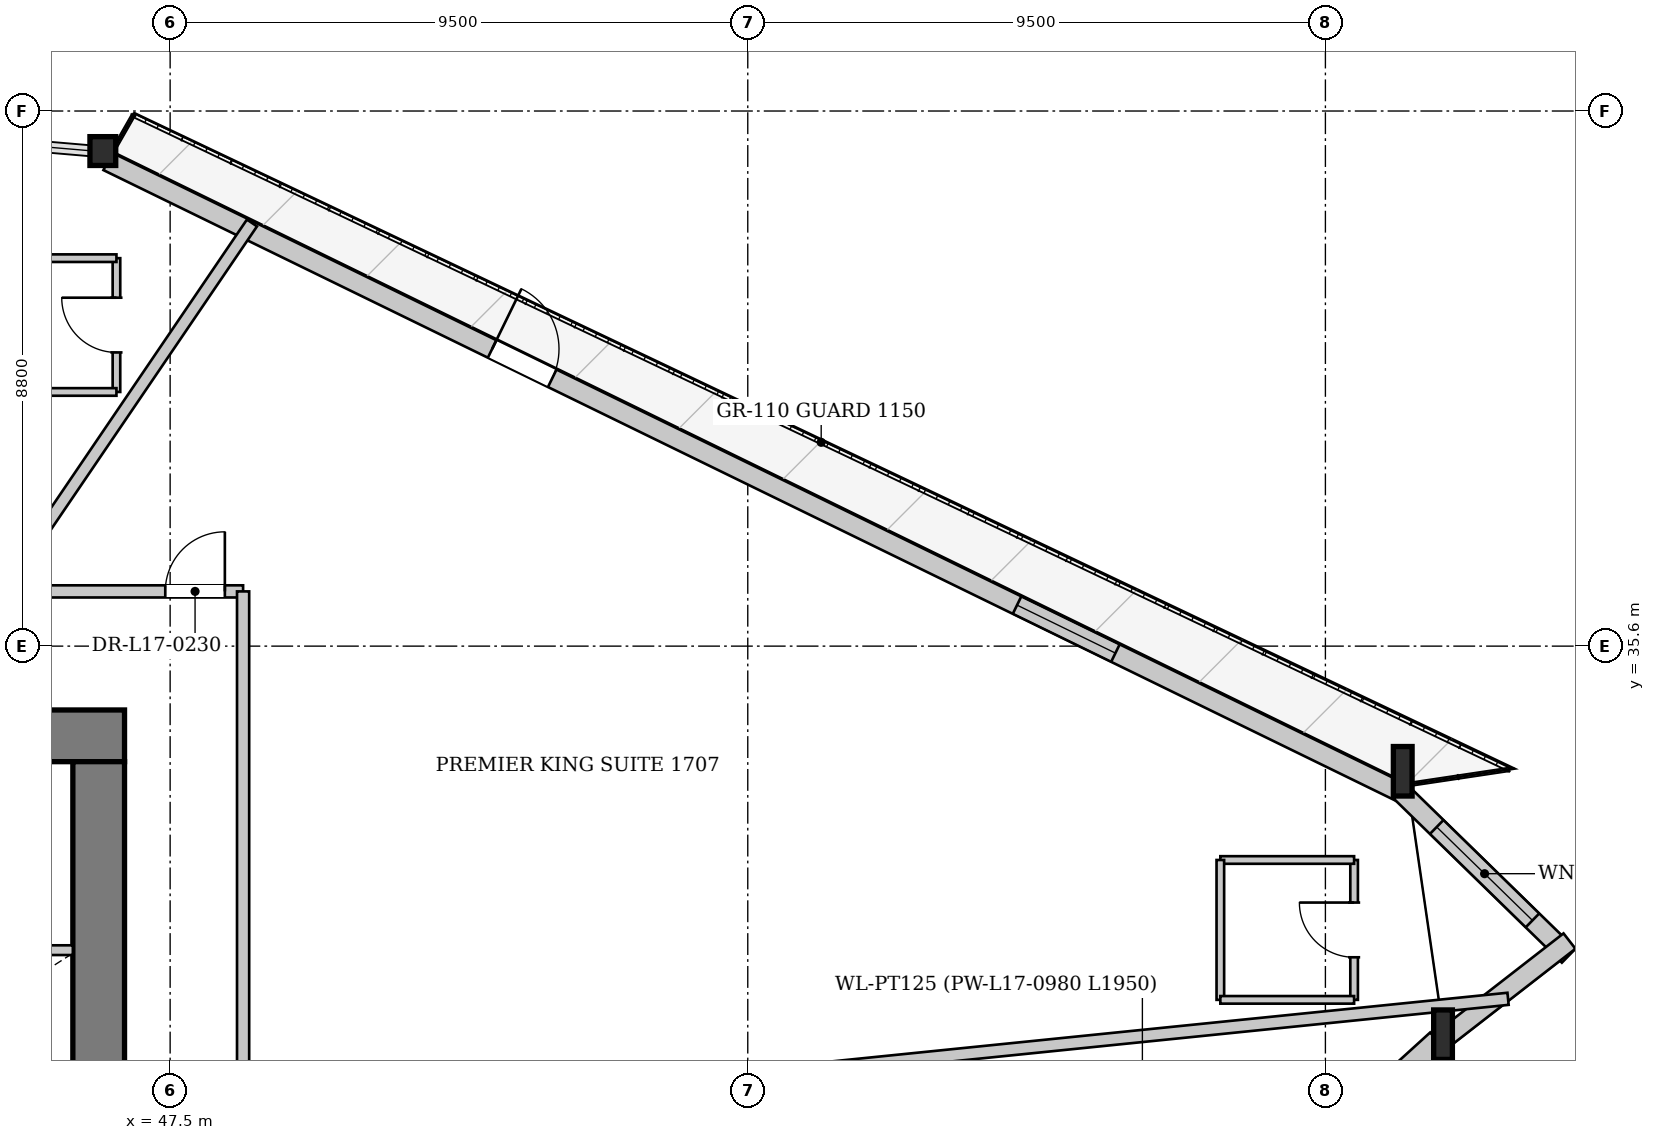
"""IFC4 building model, lengths in metres.
Left out: names, types, materials, properties, quantities, classifications, styles, units other than length and angle.
Written with IfcOpenShell. Run it as: python <this file> out.ifc"""

import sys

from ifc_helpers import new_model, si_unit, direction, frame, frame_2d, origin, origin_2d, place, context, subcontext, project, spatial, rectangle, i_section, extrude, source, transform, mapped, element, fill, save


model = new_model("IFC4")
c1 = context("Model", 3, precision=1e-05, world=origin(), true_north=direction((0.0, 1.0)))
c2 = subcontext(c1, "Body", "Model", "MODEL_VIEW")
j1 = project(units=[si_unit("LENGTHUNIT", "METRE"), si_unit("PLANEANGLEUNIT", "RADIAN")], contexts=[c1])
p1 = place(None, origin())
s1 = spatial("IfcSite", under=j1, at=p1, CompositionType="ELEMENT")
p2 = place(p1, origin())
s2 = spatial("IfcBuilding", under=s1, at=p2, CompositionType="ELEMENT")
p3 = place(p2, frame((0.0, 0.0, 68.35)))
s3 = spatial("IfcBuildingStorey", under=s2, at=p3, CompositionType="ELEMENT", Elevation=68.35)
m1 = source(origin(), c2, "Body", "SweptSolid", [
    extrude(i_section(OverallWidth=0.308, OverallDepth=0.814, WebThickness=0.021, FlangeThickness=0.04, at=origin_2d()), origin(), (0.0, 0.0, 1.0), 3.421),
])
p4 = place(p3, frame((68.478, 28.965, 0.0), z_axis=(-0.02561704692, 0.143212850053, 0.989360321868), x_axis=(-0.984376000373, -0.176079214815, 0.0)))
e1 = element("IfcColumn", 1, at=p4, inside=s3, PredefinedType="COLUMN", context=c2, shape_type="MappedRepresentation", body=[
    mapped(m1, transform((0.0, 0.0, 0.0), x_axis=(1.0, 0.0, 0.0), y_axis=(0.0, 1.0, 0.0), z_axis=(0.0, 0.0, 1.0), scale=1.0)),
])
m2 = source(origin(), c2, "Body", "SweptSolid", [
    extrude(i_section(OverallWidth=0.308, OverallDepth=0.814, WebThickness=0.021, FlangeThickness=0.04, at=origin_2d()), origin(), (0.0, 0.0, 1.0), 3.417),
])
p5 = place(p3, frame((67.847, 33.321, 0.0), z_axis=(-0.043870117237, 0.12918106183, 0.990650122939), x_axis=(-0.946887606415, -0.321564707046, 0.0)))
e2 = element("IfcColumn", 2, at=p5, inside=s3, PredefinedType="COLUMN", context=c2, shape_type="MappedRepresentation", body=[
    mapped(m2, transform((0.0, 0.0, 0.0), x_axis=(1.0, 0.0, 0.0), y_axis=(0.0, 1.0, 0.0), z_axis=(0.0, 0.0, 1.0), scale=1.0)),
])
m3 = source(origin(), c2, "Body", "SweptSolid", [
    extrude(i_section(OverallWidth=0.424, OverallDepth=0.474, WebThickness=0.043, FlangeThickness=0.068, at=origin_2d()), origin(), (0.0, 0.0, 1.0), 3.399),
])
p6 = place(p3, frame((46.543, 43.716, 0.0), z_axis=(-0.088355592773, 0.01501326739, 0.995975848617), x_axis=(-0.167517592781, -0.985869086699, 0.0)))
e3 = element("IfcColumn", 3, at=p6, inside=s3, PredefinedType="COLUMN", context=c2, shape_type="MappedRepresentation", body=[
    mapped(m3, transform((0.0, 0.0, 0.0), x_axis=(1.0, 0.0, 0.0), y_axis=(0.0, 1.0, 0.0), z_axis=(0.0, 0.0, 1.0), scale=1.0)),
])
p7 = place(p3, frame((46.473, 43.572, 0.0), z_axis=(0.0, 0.0, 1.0), x_axis=(0.898719243612, -0.438524481827, 0.0)))
e4 = element("IfcWall", 4, at=p7, inside=s3, PredefinedType="SOLIDWALL", context=c2, shape_type="SweptSolid", body=[
    extrude(rectangle(XDim=23.704, YDim=0.32, at=frame_2d((11.852, 0.0))), origin(), (0.0, 0.0, 1.0), 2.592),
])
p8 = place(p7, frame((7.035, 0.0, 0.0)))
e5 = element("IfcOpeningElement", 5, at=p8, cuts=e4, PredefinedType="OPENING", context=c2, shape_type="SweptSolid", body=[
    extrude(rectangle(XDim=1.1, YDim=2.3, at=frame_2d((0.55, 1.15))), frame((0.0, 0.17, 0.0), z_axis=(0.0, -1.0, 0.0), x_axis=(1.0, 0.0, 0.0)), (0.0, 0.0, 1.0), 0.34),
])
p9 = place(p7, frame((16.641, 0.0, 0.272)))
e6 = element("IfcOpeningElement", 6, at=p9, cuts=e4, PredefinedType="OPENING", context=c2, shape_type="SweptSolid", body=[
    extrude(rectangle(XDim=1.8, YDim=2.2, at=frame_2d((0.9, 1.1))), frame((0.0, 0.17, 0.0), z_axis=(0.0, -1.0, 0.0), x_axis=(1.0, 0.0, 0.0)), (0.0, 0.0, 1.0), 0.34),
])
p10 = place(p3, frame((67.735, 33.207, 0.0), z_axis=(0.0, 0.0, 1.0), x_axis=(0.715835098873, -0.698269368669, 0.0)))
e7 = element("IfcWall", 7, at=p10, inside=s3, PredefinedType="SOLIDWALL", context=c2, shape_type="SweptSolid", body=[
    extrude(rectangle(XDim=3.864, YDim=0.32, at=frame_2d((1.932, 0.0))), origin(), (0.0, 0.0, 1.0), 2.592),
])
p11 = place(p10, frame((0.832, 0.0, 0.222)))
e8 = element("IfcOpeningElement", 8, at=p11, cuts=e7, PredefinedType="OPENING", context=c2, shape_type="SweptSolid", body=[
    extrude(rectangle(XDim=2.2, YDim=2.25, at=frame_2d((1.1, 1.125))), frame((0.0, 0.17, 0.0), z_axis=(0.0, -1.0, 0.0), x_axis=(1.0, 0.0, 0.0)), (0.0, 0.0, 1.0), 0.34),
])
p12 = place(p3, frame((70.514, 30.75, 0.0), z_axis=(0.0, 0.0, 1.0), x_axis=(-0.789595358012, -0.613627876327, 0.0)))
e9 = element("IfcWall", 9, at=p12, inside=s3, PredefinedType="SOLIDWALL", context=c2, shape_type="SweptSolid", body=[
    extrude(rectangle(XDim=2.703, YDim=0.32, at=frame_2d((1.351, 0.0))), origin(), (0.0, 0.0, 1.0), 2.592),
])
p13 = place(p3, frame((68.351, 29.106, 0.0), z_axis=(0.0, 0.0, 1.0), x_axis=(-0.740297486448, -0.672279429671, 0.0)))
e10 = element("IfcWall", 10, at=p13, inside=s3, PredefinedType="SOLIDWALL", context=c2, shape_type="SweptSolid", body=[
    extrude(rectangle(XDim=24.318, YDim=0.38, at=frame_2d((12.159, 0.0))), origin(), (0.0, 0.0, 1.0), 2.592),
])
p14 = place(p13, frame((5.709, 0.0, 0.222)))
e11 = element("IfcOpeningElement", 11, at=p14, cuts=e10, PredefinedType="OPENING", context=c2, shape_type="SweptSolid", body=[
    extrude(rectangle(XDim=2.2, YDim=2.25, at=frame_2d((1.1, 1.125))), frame((0.0, 0.2, 0.0), z_axis=(0.0, -1.0, 0.0), x_axis=(1.0, 0.0, 0.0)), (0.0, 0.0, 1.0), 0.4),
])
p15 = place(p13, frame((16.409, 0.0, 0.222)))
e12 = element("IfcOpeningElement", 12, at=p15, cuts=e10, PredefinedType="OPENING", context=c2, shape_type="SweptSolid", body=[
    extrude(rectangle(XDim=2.2, YDim=2.25, at=frame_2d((1.1, 1.125))), frame((0.0, 0.2, 0.0), z_axis=(0.0, -1.0, 0.0), x_axis=(1.0, 0.0, 0.0)), (0.0, 0.0, 1.0), 0.4),
])
p16 = place(p3, frame((29.25, 34.125, 0.0), z_axis=(0.0, 0.0, 1.0), x_axis=(1.0, 0.0, 0.0)))
e13 = element("IfcWall", 13, at=p16, inside=s3, PredefinedType="SHEAR", context=c2, shape_type="SweptSolid", body=[
    extrude(rectangle(XDim=17.5, YDim=0.85, at=frame_2d((8.75, 0.0))), origin(), (0.0, 0.0, 1.0), 3.3),
])
p17 = place(p16, frame((1.85, 0.0, 0.0)))
e14 = element("IfcOpeningElement", 14, at=p17, cuts=e13, PredefinedType="OPENING", context=c2, shape_type="SweptSolid", body=[
    extrude(rectangle(XDim=0.95, YDim=2.1, at=frame_2d((0.475, 1.05))), frame((0.0, 0.435, 0.0), z_axis=(0.0, -1.0, 0.0), x_axis=(1.0, 0.0, 0.0)), (0.0, 0.0, 1.0), 0.87),
])
p18 = place(p16, frame((4.23, 0.0, 0.0)))
e15 = element("IfcOpeningElement", 15, at=p18, cuts=e13, PredefinedType="OPENING", context=c2, shape_type="SweptSolid", body=[
    extrude(rectangle(XDim=1.32, YDim=2.2, at=frame_2d((0.66, 1.1))), frame((0.0, 0.435, 0.0), z_axis=(0.0, -1.0, 0.0), x_axis=(1.0, 0.0, 0.0)), (0.0, 0.0, 1.0), 0.87),
])
p19 = place(p16, frame((15.3, 0.0, 0.0)))
e16 = element("IfcOpeningElement", 16, at=p19, cuts=e13, PredefinedType="OPENING", context=c2, shape_type="SweptSolid", body=[
    extrude(rectangle(XDim=0.95, YDim=2.1, at=frame_2d((0.475, 1.05))), frame((0.0, 0.435, 0.0), z_axis=(0.0, -1.0, 0.0), x_axis=(1.0, 0.0, 0.0)), (0.0, 0.0, 1.0), 0.87),
])
p20 = place(p3, frame((46.325, 33.7, 0.0), z_axis=(0.0, 0.0, 1.0), x_axis=(0.0, -1.0, 0.0)))
e17 = element("IfcWall", 17, at=p20, inside=s3, PredefinedType="SHEAR", context=c2, shape_type="SweptSolid", body=[
    extrude(rectangle(XDim=14.2, YDim=0.85, at=frame_2d((7.1, 0.0))), origin(), (0.0, 0.0, 1.0), 3.3),
])
p21 = place(p20, frame((5.18, 0.0, 0.0)))
e18 = element("IfcOpeningElement", 18, at=p21, cuts=e17, PredefinedType="OPENING", context=c2, shape_type="SweptSolid", body=[
    extrude(rectangle(XDim=1.6, YDim=2.2, at=frame_2d((0.8, 1.1))), frame((0.0, 0.435, 0.0), z_axis=(0.0, -1.0, 0.0), x_axis=(1.0, 0.0, 0.0)), (0.0, 0.0, 1.0), 0.87),
])
p22 = place(p3, frame((40.72, 30.6, 0.0), z_axis=(0.0, 0.0, 1.0), x_axis=(1.0, 0.0, 0.0)))
e19 = element("IfcWall", 19, at=p22, inside=s3, PredefinedType="PARTITIONING", context=c2, shape_type="SweptSolid", body=[
    extrude(rectangle(XDim=5.18, YDim=0.16, at=frame_2d((2.59, 0.0))), origin(), (0.0, 0.0, 1.0), 3.3),
])
p23 = place(p3, frame((48.7, 27.687, 0.0), z_axis=(0.0, 0.0, 1.0), x_axis=(0.99488143762, 0.101049122113, 0.0)))
e20 = element("IfcWall", 20, at=p23, inside=s3, PredefinedType="PARTITIONING", context=c2, shape_type="SweptSolid", body=[
    extrude(rectangle(XDim=20.911, YDim=0.2, at=frame_2d((10.456, 0.0))), origin(), (0.0, 0.0, 1.0), 2.795),
])
p24 = place(p3, frame((44.728, 36.5, 0.0), z_axis=(0.0, 0.0, 1.0), x_axis=(0.562076643958, 0.827085150584, 0.0)))
e21 = element("IfcWall", 21, at=p24, inside=s3, PredefinedType="PARTITIONING", context=c2, shape_type="SweptSolid", body=[
    extrude(rectangle(XDim=7.326, YDim=0.2, at=frame_2d((3.663, 0.0))), origin(), (0.0, 0.0, 1.0), 3.3),
])
p25 = place(p3, frame((66.972, 29.783, 0.0), z_axis=(0.0, 0.0, 1.0), x_axis=(0.0, 1.0, 0.0)))
e22 = element("IfcWall", 22, at=p25, inside=s3, PredefinedType="PARTITIONING", context=c2, shape_type="SweptSolid", body=[
    extrude(rectangle(XDim=2.3, YDim=0.125, at=frame_2d((1.15, 0.0))), origin(), (0.0, 0.0, 1.0), 3.3),
])
p26 = place(p25, frame((0.7, 0.0, 0.0)))
e23 = element("IfcOpeningElement", 23, at=p26, cuts=e22, PredefinedType="OPENING", context=c2, shape_type="SweptSolid", body=[
    extrude(rectangle(XDim=0.9, YDim=2.1, at=frame_2d((0.45, 1.05))), frame((0.0, 0.073, 0.0), z_axis=(0.0, -1.0, 0.0), x_axis=(1.0, 0.0, 0.0)), (0.0, 0.0, 1.0), 0.145),
])
p27 = place(p3, frame((66.972, 32.083, 0.0), z_axis=(0.0, 0.0, 1.0), x_axis=(-1.0, 0.0, 0.0)))
e24 = element("IfcWall", 24, at=p27, inside=s3, PredefinedType="PARTITIONING", context=c2, shape_type="SweptSolid", body=[
    extrude(rectangle(XDim=2.2, YDim=0.125, at=frame_2d((1.1, 0.0))), origin(), (0.0, 0.0, 1.0), 3.3),
])
p28 = place(p3, frame((64.772, 32.083, 0.0), z_axis=(0.0, 0.0, 1.0), x_axis=(0.0, -1.0, 0.0)))
e25 = element("IfcWall", 25, at=p28, inside=s3, PredefinedType="PARTITIONING", context=c2, shape_type="SweptSolid", body=[
    extrude(rectangle(XDim=2.3, YDim=0.125, at=frame_2d((1.15, 0.0))), origin(), (0.0, 0.0, 1.0), 3.3),
])
p29 = place(p3, frame((64.772, 29.783, 0.0), z_axis=(0.0, 0.0, 1.0), x_axis=(1.0, 0.0, 0.0)))
e26 = element("IfcWall", 26, at=p29, inside=s3, PredefinedType="PARTITIONING", context=c2, shape_type="SweptSolid", body=[
    extrude(rectangle(XDim=2.2, YDim=0.125, at=frame_2d((1.1, 0.0))), origin(), (0.0, 0.0, 1.0), 3.3),
])
p30 = place(p3, frame((46.617, 39.78, 0.0), z_axis=(0.0, 0.0, 1.0), x_axis=(0.0, 1.0, 0.0)))
e27 = element("IfcWall", 27, at=p30, inside=s3, PredefinedType="PARTITIONING", context=c2, shape_type="SweptSolid", body=[
    extrude(rectangle(XDim=2.2, YDim=0.125, at=frame_2d((1.1, 0.0))), origin(), (0.0, 0.0, 1.0), 3.3),
])
p31 = place(p30, frame((0.65, 0.0, 0.0)))
e28 = element("IfcOpeningElement", 28, at=p31, cuts=e27, PredefinedType="OPENING", context=c2, shape_type="SweptSolid", body=[
    extrude(rectangle(XDim=0.9, YDim=2.1, at=frame_2d((0.45, 1.05))), frame((0.0, 0.073, 0.0), z_axis=(0.0, -1.0, 0.0), x_axis=(1.0, 0.0, 0.0)), (0.0, 0.0, 1.0), 0.145),
])
for number, where, z_axis, x_axis in (
    (29, (46.617, 41.98, 0.0), (0.0, 0.0, 1.0), (-1.0, 0.0, 0.0)),
    (30, (44.317, 39.78, 0.0), (0.0, 0.0, 1.0), (1.0, 0.0, 0.0)),
):
    element("IfcWall", number, at=place(p3, frame(where, z_axis=z_axis, x_axis=x_axis)), inside=s3, PredefinedType="PARTITIONING", context=c2, shape_type="SweptSolid", body=[
        extrude(rectangle(XDim=2.3, YDim=0.125, at=frame_2d((1.15, 0.0))), origin(), (0.0, 0.0, 1.0), 3.3),
    ])
p32 = place(p3, frame((27.3, 36.5, 0.0), z_axis=(0.0, 0.0, 1.0), x_axis=(1.0, 0.0, 0.0)))
e31 = element("IfcWall", 31, at=p32, inside=s3, PredefinedType="PARTITIONING", context=c2, shape_type="SweptSolid", body=[
    extrude(rectangle(XDim=21.4, YDim=0.2, at=frame_2d((10.7, 0.0))), origin(), (0.0, 0.0, 1.0), 3.3),
])
p33 = place(p32, frame((3.439, 0.0, 0.0)))
e32 = element("IfcOpeningElement", 32, at=p33, cuts=e31, PredefinedType="OPENING", context=c2, shape_type="SweptSolid", body=[
    extrude(rectangle(XDim=0.98, YDim=2.15, at=frame_2d((0.49, 1.075))), frame((0.0, 0.11, 0.0), z_axis=(0.0, -1.0, 0.0), x_axis=(1.0, 0.0, 0.0)), (0.0, 0.0, 1.0), 0.22),
])
p34 = place(p32, frame((20.12, 0.0, 0.0)))
e33 = element("IfcOpeningElement", 33, at=p34, cuts=e31, PredefinedType="OPENING", context=c2, shape_type="SweptSolid", body=[
    extrude(rectangle(XDim=0.98, YDim=2.15, at=frame_2d((0.49, 1.075))), frame((0.0, 0.11, 0.0), z_axis=(0.0, -1.0, 0.0), x_axis=(1.0, 0.0, 0.0)), (0.0, 0.0, 1.0), 0.22),
])
p35 = place(p32, frame((13.104, 0.0, 0.0)))
e34 = element("IfcOpeningElement", 34, at=p35, cuts=e31, PredefinedType="OPENING", context=c2, shape_type="SweptSolid", body=[
    extrude(rectangle(XDim=0.98, YDim=2.15, at=frame_2d((0.49, 1.075))), frame((0.0, 0.11, 0.0), z_axis=(0.0, -1.0, 0.0), x_axis=(1.0, 0.0, 0.0)), (0.0, 0.0, 1.0), 0.22),
])
p36 = place(p3, frame((48.7, 16.7, 0.0), z_axis=(0.0, 0.0, 1.0), x_axis=(0.0, 1.0, 0.0)))
e35 = element("IfcWall", 35, at=p36, inside=s3, PredefinedType="PARTITIONING", context=c2, shape_type="SweptSolid", body=[
    extrude(rectangle(XDim=19.8, YDim=0.2, at=frame_2d((9.9, 0.0))), origin(), (0.0, 0.0, 1.0), 3.3),
])
p37 = place(p36, frame((4.413, 0.0, 0.0)))
e36 = element("IfcOpeningElement", 36, at=p37, cuts=e35, PredefinedType="OPENING", context=c2, shape_type="SweptSolid", body=[
    extrude(rectangle(XDim=0.98, YDim=2.15, at=frame_2d((0.49, 1.075))), frame((0.0, 0.11, 0.0), z_axis=(0.0, -1.0, 0.0), x_axis=(1.0, 0.0, 0.0)), (0.0, 0.0, 1.0), 0.22),
])
m4 = source(origin(), c2, "Body", "SweptSolid", [
    extrude(rectangle(XDim=1.1, YDim=2.3, at=frame_2d((0.55, 1.15))), frame((0.0, 0.025, 0.0), z_axis=(0.0, -1.0, 0.0), x_axis=(1.0, 0.0, 0.0)), (0.0, 0.0, 1.0), 0.05),
])
p38 = place(p8, origin())
e37 = element("IfcDoor", 37, at=p38, inside=s3, OperationType="SINGLE_SWING_LEFT", PredefinedType="DOOR", context=c2, shape_type="MappedRepresentation", body=[
    mapped(m4, transform((0.0, 0.0, 0.0), x_axis=(1.0, 0.0, 0.0), y_axis=(0.0, 1.0, 0.0), z_axis=(0.0, 0.0, 1.0), scale=1.0)),
])
fill(e5, e37)
m5 = source(origin(), c2, "Body", "SweptSolid", [
    extrude(rectangle(XDim=1.8, YDim=2.2, at=frame_2d((0.9, 1.1))), frame((0.0, 0.03, 0.0), z_axis=(0.0, -1.0, 0.0), x_axis=(1.0, 0.0, 0.0)), (0.0, 0.0, 1.0), 0.06),
])
p39 = place(p9, origin())
e38 = element("IfcWindow", 38, at=p39, inside=s3, PartitioningType="SINGLE_PANEL", PredefinedType="WINDOW", context=c2, shape_type="MappedRepresentation", body=[
    mapped(m5, transform((0.0, 0.0, 0.0), x_axis=(1.0, 0.0, 0.0), y_axis=(0.0, 1.0, 0.0), z_axis=(0.0, 0.0, 1.0), scale=1.0)),
])
fill(e6, e38)
m6 = source(origin(), c2, "Body", "SweptSolid", [
    extrude(rectangle(XDim=2.2, YDim=2.25, at=frame_2d((1.1, 1.125))), frame((0.0, 0.03, 0.0), z_axis=(0.0, -1.0, 0.0), x_axis=(1.0, 0.0, 0.0)), (0.0, 0.0, 1.0), 0.06),
])
p40 = place(p11, origin())
e39 = element("IfcWindow", 39, at=p40, inside=s3, PartitioningType="SINGLE_PANEL", PredefinedType="WINDOW", context=c2, shape_type="MappedRepresentation", body=[
    mapped(m6, transform((0.0, 0.0, 0.0), x_axis=(1.0, 0.0, 0.0), y_axis=(0.0, 1.0, 0.0), z_axis=(0.0, 0.0, 1.0), scale=1.0)),
])
fill(e8, e39)
m7 = source(origin(), c2, "Body", "SweptSolid", [
    extrude(rectangle(XDim=0.9, YDim=2.1, at=frame_2d((0.45, 1.05))), frame((0.0, 0.025, 0.0), z_axis=(0.0, -1.0, 0.0), x_axis=(1.0, 0.0, 0.0)), (0.0, 0.0, 1.0), 0.05),
])
p41 = place(p26, origin())
e40 = element("IfcDoor", 40, at=p41, inside=s3, OperationType="SINGLE_SWING_RIGHT", PredefinedType="DOOR", context=c2, shape_type="MappedRepresentation", body=[
    mapped(m7, transform((0.0, 0.0, 0.0), x_axis=(1.0, 0.0, 0.0), y_axis=(0.0, 1.0, 0.0), z_axis=(0.0, 0.0, 1.0), scale=1.0)),
])
fill(e23, e40)
p42 = place(p31, origin())
e41 = element("IfcDoor", 41, at=p42, inside=s3, OperationType="SINGLE_SWING_RIGHT", PredefinedType="DOOR", context=c2, shape_type="MappedRepresentation", body=[
    mapped(m7, transform((0.0, 0.0, 0.0), x_axis=(1.0, 0.0, 0.0), y_axis=(0.0, 1.0, 0.0), z_axis=(0.0, 0.0, 1.0), scale=1.0)),
])
fill(e28, e41)
m8 = source(origin(), c2, "Body", "SweptSolid", [
    extrude(rectangle(XDim=0.98, YDim=2.15, at=frame_2d((0.49, 1.075))), frame((0.0, 0.025, 0.0), z_axis=(0.0, -1.0, 0.0), x_axis=(1.0, 0.0, 0.0)), (0.0, 0.0, 1.0), 0.05),
])
p43 = place(p34, origin())
e42 = element("IfcDoor", 42, at=p43, inside=s3, OperationType="SINGLE_SWING_RIGHT", PredefinedType="DOOR", context=c2, shape_type="MappedRepresentation", body=[
    mapped(m8, transform((0.0, 0.0, 0.0), x_axis=(1.0, 0.0, 0.0), y_axis=(0.0, 1.0, 0.0), z_axis=(0.0, 0.0, 1.0), scale=1.0)),
])
fill(e33, e42)
save(model, sys.argv[1])
